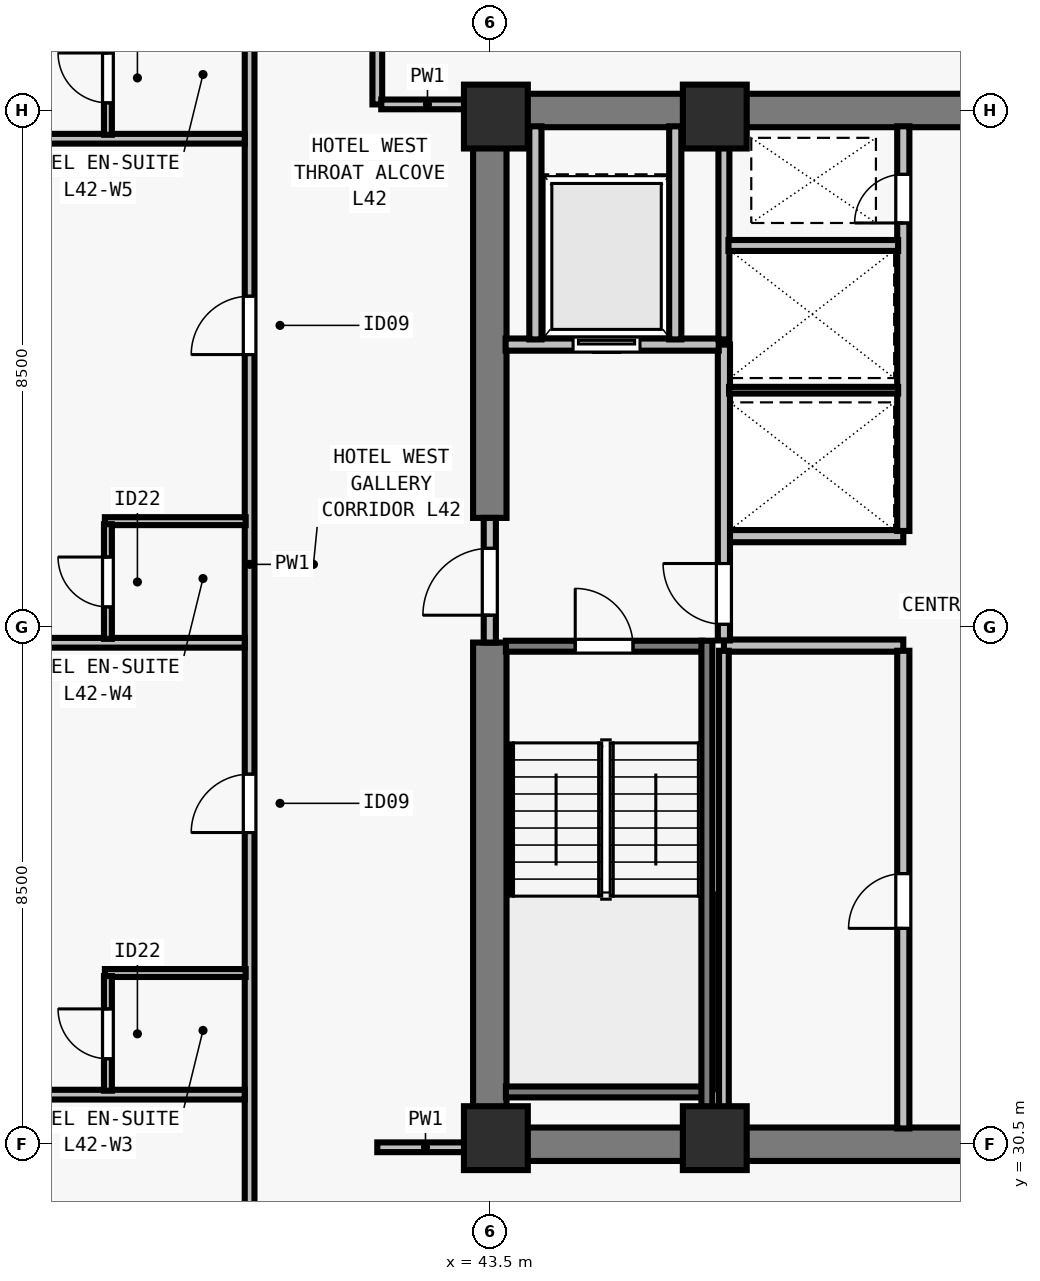
"""IFC4 building model, lengths in metres.
Left out: names, types, materials, properties, quantities, classifications, styles, units other than length and angle.
Written with IfcOpenShell. Run it as: python <this file> out.ifc"""

import sys

from ifc_helpers import new_model, si_unit, direction, frame, frame_2d, origin, origin_2d, place, context, subcontext, project, spatial, rectangle, extrude, element, fill, save


model = new_model("IFC4")
c1 = context("Model", 3, precision=1e-05, world=origin(), true_north=direction((0.0, 1.0)))
c2 = subcontext(c1, "Body", "Model", "MODEL_VIEW")
j1 = project(units=[si_unit("LENGTHUNIT", "METRE"), si_unit("PLANEANGLEUNIT", "RADIAN")], contexts=[c1])
p1 = place(None, origin())
s1 = spatial("IfcSite", under=j1, at=p1, CompositionType="ELEMENT")
p2 = place(p1, origin())
s2 = spatial("IfcBuilding", under=s1, at=p2, CompositionType="ELEMENT")
p3 = place(p2, frame((0.0, 0.0, 155.0)))
s3 = spatial("IfcBuildingStorey", under=s2, at=p3, CompositionType="ELEMENT", Elevation=155.0)
for number, where, z_axis, x_axis in (
    (1, (43.6, 30.6, 0.0), (0.0, 0.0, 1.0), (1.0, 0.0, 0.0)),
    (2, (47.2, 30.6, 0.0), (0.0, 0.0, 1.0), (1.0, 0.0, 0.0)),
    (3, (43.6, 47.4, 0.0), (0.0, 0.0, 1.0), (1.0, 0.0, 0.0)),
    (4, (47.2, 47.4, 0.0), (0.0, 0.0, 1.0), (1.0, 0.0, 0.0)),
):
    element("IfcColumn", number, at=place(p3, frame(where, z_axis=z_axis, x_axis=x_axis)), inside=s3, PredefinedType="COLUMN", context=c2, shape_type="SweptSolid", body=[
        extrude(rectangle(XDim=1.05, YDim=1.05, at=origin_2d()), origin(), (0.0, 0.0, 1.0), 3.5),
    ])
for number, where, z_axis, x_axis in (
    (5, (43.225, 30.5, 0.0), (0.0, 0.0, 1.0), (1.0, 0.0, 0.0)),
    (6, (43.225, 47.5, 0.0), (0.0, 0.0, 1.0), (1.0, 0.0, 0.0)),
):
    element("IfcWall", number, at=place(p3, frame(where, z_axis=z_axis, x_axis=x_axis)), inside=s3, PredefinedType="SHEAR", context=c2, shape_type="SweptSolid", body=[
        extrude(rectangle(XDim=17.55, YDim=0.55, at=frame_2d((8.775, 0.0))), origin(), (0.0, 0.0, 1.0), 3.28),
    ])
p4 = place(p3, frame((43.5, 30.765, 0.0), z_axis=(0.0, 0.0, 1.0), x_axis=(0.0, 1.0, 0.0)))
e7 = element("IfcWall", 7, at=p4, inside=s3, PredefinedType="SHEAR", context=c2, shape_type="SweptSolid", body=[
    extrude(rectangle(XDim=7.985, YDim=0.55, at=frame_2d((3.993, 0.0))), origin(), (0.0, 0.0, 1.0), 3.28),
])
p5 = place(p3, frame((43.5, 40.8, 0.0), z_axis=(0.0, 0.0, 1.0), x_axis=(0.0, 1.0, 0.0)))
e8 = element("IfcWall", 8, at=p5, inside=s3, PredefinedType="SHEAR", context=c2, shape_type="SweptSolid", body=[
    extrude(rectangle(XDim=6.435, YDim=0.55, at=frame_2d((3.218, 0.0))), origin(), (0.0, 0.0, 1.0), 3.28),
])
for number, where, z_axis, x_axis in (
    (9, (47.35, 38.7, 0.0), (0.0, 0.0, 1.0), (1.0, 0.0, 0.0)),
    (10, (47.35, 40.5, 0.0), (0.0, 0.0, 1.0), (1.0, 0.0, 0.0)),
):
    element("IfcWall", number, at=place(p3, frame(where, z_axis=z_axis, x_axis=x_axis)), inside=s3, PredefinedType="SOLIDWALL", context=c2, shape_type="SweptSolid", body=[
        extrude(rectangle(XDim=2.95, YDim=0.2, at=frame_2d((1.475, 0.0))), origin(), (0.0, 0.0, 1.0), 3.28),
    ])
p6 = place(p3, frame((50.3, 30.76, 0.0), z_axis=(0.0, 0.0, 1.0), x_axis=(0.0, 1.0, 0.0)))
e11 = element("IfcWall", 11, at=p6, inside=s3, PredefinedType="SOLIDWALL", context=c2, shape_type="SweptSolid", body=[
    extrude(rectangle(XDim=7.855, YDim=0.2, at=frame_2d((3.927, 0.0))), origin(), (0.0, 0.0, 1.0), 3.28),
])
p7 = place(p6, frame((3.29, 0.0, 0.0)))
e12 = element("IfcOpeningElement", 12, at=p7, cuts=e11, PredefinedType="OPENING", context=c2, shape_type="SweptSolid", body=[
    extrude(rectangle(XDim=0.9, YDim=2.12, at=frame_2d((0.45, 1.06))), frame((0.0, 0.11, 0.0), z_axis=(0.0, -1.0, 0.0), x_axis=(1.0, 0.0, 0.0)), (0.0, 0.0, 1.0), 0.22),
])
p8 = place(p3, frame((50.3, 40.585, 0.0), z_axis=(0.0, 0.0, 1.0), x_axis=(0.0, 1.0, 0.0)))
e13 = element("IfcWall", 13, at=p8, inside=s3, PredefinedType="SOLIDWALL", context=c2, shape_type="SweptSolid", body=[
    extrude(rectangle(XDim=6.655, YDim=0.2, at=frame_2d((3.328, 0.0))), origin(), (0.0, 0.0, 1.0), 3.28),
])
p9 = place(p8, frame((5.065, 0.0, 0.0)))
e14 = element("IfcOpeningElement", 14, at=p9, cuts=e13, PredefinedType="OPENING", context=c2, shape_type="SweptSolid", body=[
    extrude(rectangle(XDim=0.8, YDim=2.08, at=frame_2d((0.4, 1.04))), frame((0.0, 0.11, 0.0), z_axis=(0.0, -1.0, 0.0), x_axis=(1.0, 0.0, 0.0)), (0.0, 0.0, 1.0), 0.22),
])
p10 = place(p3, frame((43.5, 38.75, 0.0), z_axis=(0.0, 0.0, 1.0), x_axis=(0.0, 1.0, 0.0)))
e15 = element("IfcWall", 15, at=p10, inside=s3, PredefinedType="SOLIDWALL", context=c2, shape_type="SweptSolid", body=[
    extrude(rectangle(XDim=2.05, YDim=0.2, at=frame_2d((1.025, 0.0))), origin(), (0.0, 0.0, 1.0), 3.28),
])
p11 = place(p10, frame((0.45, 0.0, 0.0)))
e16 = element("IfcOpeningElement", 16, at=p11, cuts=e15, PredefinedType="OPENING", context=c2, shape_type="SweptSolid", body=[
    extrude(rectangle(XDim=1.1, YDim=2.15, at=frame_2d((0.55, 1.075))), frame((0.0, 0.11, 0.0), z_axis=(0.0, -1.0, 0.0), x_axis=(1.0, 0.0, 0.0)), (0.0, 0.0, 1.0), 0.22),
])
p12 = place(p3, frame((47.35, 38.785, 0.0), z_axis=(0.0, 0.0, 1.0), x_axis=(0.0, 1.0, 0.0)))
e17 = element("IfcWall", 17, at=p12, inside=s3, PredefinedType="SOLIDWALL", context=c2, shape_type="SweptSolid", body=[
    extrude(rectangle(XDim=4.865, YDim=0.2, at=frame_2d((2.433, 0.0))), origin(), (0.0, 0.0, 1.0), 3.28),
])
p13 = place(p12, frame((0.265, 0.0, 0.0)))
e18 = element("IfcOpeningElement", 18, at=p13, cuts=e17, PredefinedType="OPENING", context=c2, shape_type="SweptSolid", body=[
    extrude(rectangle(XDim=1.0, YDim=2.15, at=frame_2d((0.5, 1.075))), frame((0.0, 0.11, 0.0), z_axis=(0.0, -1.0, 0.0), x_axis=(1.0, 0.0, 0.0)), (0.0, 0.0, 1.0), 0.22),
])
p14 = place(p3, frame((43.76, 43.65, 0.0), z_axis=(0.0, 0.0, 1.0), x_axis=(1.0, 0.0, 0.0)))
e19 = element("IfcWall", 19, at=p14, inside=s3, PredefinedType="SOLIDWALL", context=c2, shape_type="SweptSolid", body=[
    extrude(rectangle(XDim=3.505, YDim=0.2, at=frame_2d((1.752, 0.0))), origin(), (0.0, 0.0, 1.0), 3.28),
])
p15 = place(p14, frame((1.11, 0.0, 0.0)))
e20 = element("IfcOpeningElement", 20, at=p15, cuts=e19, PredefinedType="OPENING", context=c2, shape_type="SweptSolid", body=[
    extrude(rectangle(XDim=1.1, YDim=2.2, at=frame_2d((0.55, 1.1))), frame((0.0, 0.11, 0.0), z_axis=(0.0, -1.0, 0.0), x_axis=(1.0, 0.0, 0.0)), (0.0, 0.0, 1.0), 0.22),
])
for number, where, z_axis, x_axis in (
    (21, (46.55, 43.735, 0.0), (0.0, 0.0, 1.0), (0.0, 1.0, 0.0)),
    (22, (44.25, 43.735, 0.0), (0.0, 0.0, 1.0), (0.0, 1.0, 0.0)),
):
    element("IfcWall", number, at=place(p3, frame(where, z_axis=z_axis, x_axis=x_axis)), inside=s3, PredefinedType="SOLIDWALL", context=c2, shape_type="SweptSolid", body=[
        extrude(rectangle(XDim=3.505, YDim=0.2, at=frame_2d((1.752, 0.0))), origin(), (0.0, 0.0, 1.0), 3.28),
    ])
p16 = place(p3, frame((47.35, 30.76, 0.0), z_axis=(0.0, 0.0, 1.0), x_axis=(0.0, 1.0, 0.0)))
e23 = element("IfcWall", 23, at=p16, inside=s3, PredefinedType="PARTITIONING", context=c2, shape_type="SweptSolid", body=[
    extrude(rectangle(XDim=7.855, YDim=0.16, at=frame_2d((3.927, 0.0))), origin(), (0.0, 0.0, 1.0), 3.28),
])
p17 = place(p3, frame((47.35, 43.735, 0.0), z_axis=(0.0, 0.0, 1.0), x_axis=(0.0, 1.0, 0.0)))
e24 = element("IfcWall", 24, at=p17, inside=s3, PredefinedType="SOLIDWALL", context=c2, shape_type="SweptSolid", body=[
    extrude(rectangle(XDim=3.505, YDim=0.18, at=frame_2d((1.752, 0.0))), origin(), (0.0, 0.0, 1.0), 3.28),
])
p18 = place(p3, frame((47.435, 42.9, 0.0), z_axis=(0.0, 0.0, 1.0), x_axis=(1.0, 0.0, 0.0)))
e25 = element("IfcWall", 25, at=p18, inside=s3, PredefinedType="PARTITIONING", context=c2, shape_type="SweptSolid", body=[
    extrude(rectangle(XDim=2.78, YDim=0.11, at=frame_2d((1.39, 0.0))), origin(), (0.0, 0.0, 1.0), 3.28),
])
p19 = place(p3, frame((47.425, 45.28, 0.0), z_axis=(0.0, 0.0, 1.0), x_axis=(1.0, 0.0, 0.0)))
e26 = element("IfcWall", 26, at=p19, inside=s3, PredefinedType="SOLIDWALL", context=c2, shape_type="SweptSolid", body=[
    extrude(rectangle(XDim=2.79, YDim=0.18, at=frame_2d((1.395, 0.0))), origin(), (0.0, 0.0, 1.0), 3.28),
])
p20 = place(p3, frame((39.55, 15.325, 0.0), z_axis=(0.0, 0.0, 1.0), x_axis=(0.0, 1.0, 0.0)))
e27 = element("IfcWall", 27, at=p20, inside=s3, PredefinedType="PARTITIONING", context=c2, shape_type="SweptSolid", body=[
    extrude(rectangle(XDim=47.35, YDim=0.16, at=frame_2d((23.675, 0.0))), origin(), (0.0, 0.0, 1.0), 2.555),
])
p21 = place(p20, frame((4.718, 0.0, 0.0)))
e28 = element("IfcOpeningElement", 28, at=p21, cuts=e27, PredefinedType="OPENING", context=c2, shape_type="SweptSolid", body=[
    extrude(rectangle(XDim=0.96, YDim=2.15, at=frame_2d((0.48, 1.075))), frame((0.0, 0.09, 0.0), z_axis=(0.0, -1.0, 0.0), x_axis=(1.0, 0.0, 0.0)), (0.0, 0.0, 1.0), 0.18),
])
p22 = place(p20, frame((12.441, 0.0, 0.0)))
e29 = element("IfcOpeningElement", 29, at=p22, cuts=e27, PredefinedType="OPENING", context=c2, shape_type="SweptSolid", body=[
    extrude(rectangle(XDim=0.96, YDim=2.15, at=frame_2d((0.48, 1.075))), frame((0.0, 0.09, 0.0), z_axis=(0.0, -1.0, 0.0), x_axis=(1.0, 0.0, 0.0)), (0.0, 0.0, 1.0), 0.18),
])
p23 = place(p20, frame((20.301, 0.0, 0.0)))
e30 = element("IfcOpeningElement", 30, at=p23, cuts=e27, PredefinedType="OPENING", context=c2, shape_type="SweptSolid", body=[
    extrude(rectangle(XDim=0.96, YDim=2.15, at=frame_2d((0.48, 1.075))), frame((0.0, 0.09, 0.0), z_axis=(0.0, -1.0, 0.0), x_axis=(1.0, 0.0, 0.0)), (0.0, 0.0, 1.0), 0.18),
])
p24 = place(p20, frame((28.161, 0.0, 0.0)))
e31 = element("IfcOpeningElement", 31, at=p24, cuts=e27, PredefinedType="OPENING", context=c2, shape_type="SweptSolid", body=[
    extrude(rectangle(XDim=0.96, YDim=2.15, at=frame_2d((0.48, 1.075))), frame((0.0, 0.09, 0.0), z_axis=(0.0, -1.0, 0.0), x_axis=(1.0, 0.0, 0.0)), (0.0, 0.0, 1.0), 0.18),
])
p25 = place(p20, frame((36.021, 0.0, 0.0)))
e32 = element("IfcOpeningElement", 32, at=p25, cuts=e27, PredefinedType="OPENING", context=c2, shape_type="SweptSolid", body=[
    extrude(rectangle(XDim=0.96, YDim=2.15, at=frame_2d((0.48, 1.075))), frame((0.0, 0.09, 0.0), z_axis=(0.0, -1.0, 0.0), x_axis=(1.0, 0.0, 0.0)), (0.0, 0.0, 1.0), 0.18),
])
p26 = place(p20, frame((43.793, 0.0, 0.0)))
e33 = element("IfcOpeningElement", 33, at=p26, cuts=e27, PredefinedType="OPENING", context=c2, shape_type="SweptSolid", body=[
    extrude(rectangle(XDim=0.96, YDim=2.15, at=frame_2d((0.48, 1.075))), frame((0.0, 0.09, 0.0), z_axis=(0.0, -1.0, 0.0), x_axis=(1.0, 0.0, 0.0)), (0.0, 0.0, 1.0), 0.18),
])
p27 = place(p3, frame((41.65, 47.6, 0.0), z_axis=(0.0, 0.0, 1.0), x_axis=(0.0, 1.0, 0.0)))
e34 = element("IfcWall", 34, at=p27, inside=s3, PredefinedType="PARTITIONING", context=c2, shape_type="SweptSolid", body=[
    extrude(rectangle(XDim=15.075, YDim=0.16, at=frame_2d((7.538, 0.0))), origin(), (0.0, 0.0, 1.0), 2.555),
])
p28 = place(p27, frame((1.8, 0.0, 0.0)))
e35 = element("IfcOpeningElement", 35, at=p28, cuts=e34, PredefinedType="OPENING", context=c2, shape_type="SweptSolid", body=[
    extrude(rectangle(XDim=0.96, YDim=2.12, at=frame_2d((0.48, 1.06))), frame((0.0, 0.09, 0.0), z_axis=(0.0, -1.0, 0.0), x_axis=(1.0, 0.0, 0.0)), (0.0, 0.0, 1.0), 0.18),
])
p29 = place(p3, frame((41.65, 30.45, 0.0), z_axis=(0.0, 0.0, 1.0), x_axis=(1.0, 0.0, 0.0)))
e36 = element("IfcWall", 36, at=p29, inside=s3, PredefinedType="PARTITIONING", context=c2, shape_type="SweptSolid", body=[
    extrude(rectangle(XDim=1.585, YDim=0.16, at=frame_2d((0.792, 0.0))), origin(), (0.0, 0.0, 1.0), 3.28),
])
p30 = place(p3, frame((41.715, 47.6, 0.0), z_axis=(0.0, 0.0, 1.0), x_axis=(1.0, 0.0, 0.0)))
e37 = element("IfcWall", 37, at=p30, inside=s3, PredefinedType="PARTITIONING", context=c2, shape_type="SweptSolid", body=[
    extrude(rectangle(XDim=1.52, YDim=0.16, at=frame_2d((0.76, 0.0))), origin(), (0.0, 0.0, 1.0), 3.28),
])
p31 = place(p3, frame((28.325, 31.315, 0.0), z_axis=(0.0, 0.0, 1.0), x_axis=(1.0, 0.0, 0.0)))
e38 = element("IfcWall", 38, at=p31, inside=s3, PredefinedType="PARTITIONING", context=c2, shape_type="SweptSolid", body=[
    extrude(rectangle(XDim=11.145, YDim=0.16, at=frame_2d((5.573, 0.0))), origin(), (0.0, 0.0, 1.0), 3.28),
])
p32 = place(p3, frame((37.17, 33.315, 0.0), z_axis=(0.0, 0.0, 1.0), x_axis=(1.0, 0.0, 0.0)))
e39 = element("IfcWall", 39, at=p32, inside=s3, PredefinedType="PLUMBINGWALL", context=c2, shape_type="SweptSolid", body=[
    extrude(rectangle(XDim=2.315, YDim=0.13, at=frame_2d((1.158, 0.0))), origin(), (0.0, 0.0, 1.0), 3.28),
])
p33 = place(p3, frame((37.22, 31.381, 0.0), z_axis=(0.0, 0.0, 1.0), x_axis=(0.0, 1.0, 0.0)))
e40 = element("IfcWall", 40, at=p33, inside=s3, PredefinedType="PLUMBINGWALL", context=c2, shape_type="SweptSolid", body=[
    extrude(rectangle(XDim=1.885, YDim=0.13, at=frame_2d((0.942, 0.0))), origin(), (0.0, 0.0, 1.0), 3.28),
])
p34 = place(p33, frame((0.525, 0.0, 0.0)))
e41 = element("IfcOpeningElement", 41, at=p34, cuts=e40, PredefinedType="OPENING", context=c2, shape_type="SweptSolid", body=[
    extrude(rectangle(XDim=0.82, YDim=2.1, at=frame_2d((0.41, 1.05))), frame((0.0, 0.075, 0.0), z_axis=(0.0, -1.0, 0.0), x_axis=(1.0, 0.0, 0.0)), (0.0, 0.0, 1.0), 0.15),
])
p35 = place(p3, frame((28.325, 38.747, 0.0), z_axis=(0.0, 0.0, 1.0), x_axis=(1.0, 0.0, 0.0)))
e42 = element("IfcWall", 42, at=p35, inside=s3, PredefinedType="PARTITIONING", context=c2, shape_type="SweptSolid", body=[
    extrude(rectangle(XDim=11.145, YDim=0.16, at=frame_2d((5.573, 0.0))), origin(), (0.0, 0.0, 1.0), 2.896),
])
p36 = place(p3, frame((37.17, 40.747, 0.0), z_axis=(0.0, 0.0, 1.0), x_axis=(1.0, 0.0, 0.0)))
e43 = element("IfcWall", 43, at=p36, inside=s3, PredefinedType="PLUMBINGWALL", context=c2, shape_type="SweptSolid", body=[
    extrude(rectangle(XDim=2.315, YDim=0.13, at=frame_2d((1.158, 0.0))), origin(), (0.0, 0.0, 1.0), 3.28),
])
p37 = place(p3, frame((37.22, 38.812, 0.0), z_axis=(0.0, 0.0, 1.0), x_axis=(0.0, 1.0, 0.0)))
e44 = element("IfcWall", 44, at=p37, inside=s3, PredefinedType="PLUMBINGWALL", context=c2, shape_type="SweptSolid", body=[
    extrude(rectangle(XDim=1.885, YDim=0.13, at=frame_2d((0.942, 0.0))), origin(), (0.0, 0.0, 1.0), 3.28),
])
p38 = place(p37, frame((0.525, 0.0, 0.0)))
e45 = element("IfcOpeningElement", 45, at=p38, cuts=e44, PredefinedType="OPENING", context=c2, shape_type="SweptSolid", body=[
    extrude(rectangle(XDim=0.82, YDim=2.1, at=frame_2d((0.41, 1.05))), frame((0.0, 0.075, 0.0), z_axis=(0.0, -1.0, 0.0), x_axis=(1.0, 0.0, 0.0)), (0.0, 0.0, 1.0), 0.15),
])
p39 = place(p3, frame((28.325, 47.035, 0.0), z_axis=(0.0, 0.0, 1.0), x_axis=(1.0, 0.0, 0.0)))
e46 = element("IfcWall", 46, at=p39, inside=s3, PredefinedType="PARTITIONING", context=c2, shape_type="SweptSolid", body=[
    extrude(rectangle(XDim=11.145, YDim=0.16, at=frame_2d((5.573, 0.0))), origin(), (0.0, 0.0, 1.0), 3.28),
])
p40 = place(p3, frame((37.22, 47.101, 0.0), z_axis=(0.0, 0.0, 1.0), x_axis=(0.0, 1.0, 0.0)))
e47 = element("IfcWall", 47, at=p40, inside=s3, PredefinedType="PLUMBINGWALL", context=c2, shape_type="SweptSolid", body=[
    extrude(rectangle(XDim=1.885, YDim=0.13, at=frame_2d((0.942, 0.0))), origin(), (0.0, 0.0, 1.0), 3.28),
])
p41 = place(p40, frame((0.525, 0.0, 0.0)))
e48 = element("IfcOpeningElement", 48, at=p41, cuts=e47, PredefinedType="OPENING", context=c2, shape_type="SweptSolid", body=[
    extrude(rectangle(XDim=0.82, YDim=2.1, at=frame_2d((0.41, 1.05))), frame((0.0, 0.075, 0.0), z_axis=(0.0, -1.0, 0.0), x_axis=(1.0, 0.0, 0.0)), (0.0, 0.0, 1.0), 0.15),
])
p42 = place(p3, frame((43.765, 38.69, 0.0), z_axis=(0.0, 0.0, 1.0), x_axis=(1.0, 0.0, 0.0)))
e49 = element("IfcWall", 49, at=p42, inside=s3, PredefinedType="SOLIDWALL", context=c2, shape_type="SweptSolid", body=[
    extrude(rectangle(XDim=3.23, YDim=0.18, at=frame_2d((1.615, 0.0))), origin(), (0.0, 0.0, 1.0), 3.28),
])
p43 = place(p42, frame((1.14, 0.0, 0.0)))
e50 = element("IfcOpeningElement", 50, at=p43, cuts=e49, PredefinedType="OPENING", context=c2, shape_type="SweptSolid", body=[
    extrude(rectangle(XDim=0.95, YDim=2.15, at=frame_2d((0.475, 1.075))), frame((0.0, 0.1, 0.0), z_axis=(0.0, -1.0, 0.0), x_axis=(1.0, 0.0, 0.0)), (0.0, 0.0, 1.0), 0.2),
])
p44 = place(p3, frame((43.765, 31.36, 0.0), z_axis=(0.0, 0.0, 1.0), x_axis=(1.0, 0.0, 0.0)))
e51 = element("IfcWall", 51, at=p44, inside=s3, PredefinedType="SOLIDWALL", context=c2, shape_type="SweptSolid", body=[
    extrude(rectangle(XDim=3.23, YDim=0.18, at=frame_2d((1.615, 0.0))), origin(), (0.0, 0.0, 1.0), 3.28),
])
p45 = place(p3, frame((47.07, 38.78, 0.0), z_axis=(0.0, 0.0, 1.0), x_axis=(0.0, -1.0, 0.0)))
e52 = element("IfcWall", 52, at=p45, inside=s3, PredefinedType="SOLIDWALL", context=c2, shape_type="SweptSolid", body=[
    extrude(rectangle(XDim=8.017, YDim=0.18, at=frame_2d((4.009, 0.0))), origin(), (0.0, 0.0, 1.0), 3.28),
])
p46 = place(p11, origin())
e53 = element("IfcDoor", 53, at=p46, inside=s3, OperationType="SINGLE_SWING_LEFT", PredefinedType="DOOR", context=c2, shape_type="SweptSolid", body=[
    extrude(rectangle(XDim=1.1, YDim=2.15, at=frame_2d((0.55, 1.075))), frame((0.0, 0.025, 0.0), z_axis=(0.0, -1.0, 0.0), x_axis=(1.0, 0.0, 0.0)), (0.0, 0.0, 1.0), 0.05),
])
fill(e16, e53)
p47 = place(p13, origin())
e54 = element("IfcDoor", 54, at=p47, inside=s3, OperationType="SINGLE_SWING_RIGHT", PredefinedType="DOOR", context=c2, shape_type="SweptSolid", body=[
    extrude(rectangle(XDim=1.0, YDim=2.15, at=frame_2d((0.5, 1.075))), frame((0.0, 0.025, 0.0), z_axis=(0.0, -1.0, 0.0), x_axis=(1.0, 0.0, 0.0)), (0.0, 0.0, 1.0), 0.05),
])
fill(e18, e54)
p48 = place(p15, origin())
e55 = element("IfcDoor", 55, at=p48, inside=s3, OperationType="SLIDING_TO_LEFT", PredefinedType="DOOR", context=c2, shape_type="SweptSolid", body=[
    extrude(rectangle(XDim=1.1, YDim=2.2, at=frame_2d((0.55, 1.1))), frame((0.0, 0.025, 0.0), z_axis=(0.0, -1.0, 0.0), x_axis=(1.0, 0.0, 0.0)), (0.0, 0.0, 1.0), 0.05),
])
fill(e20, e55)
p49 = place(p7, origin())
e56 = element("IfcDoor", 56, at=p49, inside=s3, OperationType="SINGLE_SWING_LEFT", PredefinedType="DOOR", context=c2, shape_type="SweptSolid", body=[
    extrude(rectangle(XDim=0.9, YDim=2.12, at=frame_2d((0.45, 1.06))), frame((0.0, 0.025, 0.0), z_axis=(0.0, -1.0, 0.0), x_axis=(1.0, 0.0, 0.0)), (0.0, 0.0, 1.0), 0.05),
])
fill(e12, e56)
p50 = place(p9, origin())
e57 = element("IfcDoor", 57, at=p50, inside=s3, OperationType="SINGLE_SWING_LEFT", PredefinedType="DOOR", context=c2, shape_type="SweptSolid", body=[
    extrude(rectangle(XDim=0.8, YDim=2.08, at=frame_2d((0.4, 1.04))), frame((0.0, 0.025, 0.0), z_axis=(0.0, -1.0, 0.0), x_axis=(1.0, 0.0, 0.0)), (0.0, 0.0, 1.0), 0.05),
])
fill(e14, e57)
p51 = place(p34, origin())
e58 = element("IfcDoor", 58, at=p51, inside=s3, OperationType="SINGLE_SWING_RIGHT", PredefinedType="DOOR", context=c2, shape_type="SweptSolid", body=[
    extrude(rectangle(XDim=0.82, YDim=2.1, at=frame_2d((0.41, 1.05))), frame((0.0, 0.025, 0.0), z_axis=(0.0, -1.0, 0.0), x_axis=(1.0, 0.0, 0.0)), (0.0, 0.0, 1.0), 0.05),
])
fill(e41, e58)
p52 = place(p23, origin())
e59 = element("IfcDoor", 59, at=p52, inside=s3, OperationType="SINGLE_SWING_LEFT", PredefinedType="DOOR", context=c2, shape_type="SweptSolid", body=[
    extrude(rectangle(XDim=0.96, YDim=2.15, at=frame_2d((0.48, 1.075))), frame((0.0, 0.025, 0.0), z_axis=(0.0, -1.0, 0.0), x_axis=(1.0, 0.0, 0.0)), (0.0, 0.0, 1.0), 0.05),
])
fill(e30, e59)
p53 = place(p38, origin())
e60 = element("IfcDoor", 60, at=p53, inside=s3, OperationType="SINGLE_SWING_RIGHT", PredefinedType="DOOR", context=c2, shape_type="SweptSolid", body=[
    extrude(rectangle(XDim=0.82, YDim=2.1, at=frame_2d((0.41, 1.05))), frame((0.0, 0.025, 0.0), z_axis=(0.0, -1.0, 0.0), x_axis=(1.0, 0.0, 0.0)), (0.0, 0.0, 1.0), 0.05),
])
fill(e45, e60)
p54 = place(p24, origin())
e61 = element("IfcDoor", 61, at=p54, inside=s3, OperationType="SINGLE_SWING_LEFT", PredefinedType="DOOR", context=c2, shape_type="SweptSolid", body=[
    extrude(rectangle(XDim=0.96, YDim=2.15, at=frame_2d((0.48, 1.075))), frame((0.0, 0.025, 0.0), z_axis=(0.0, -1.0, 0.0), x_axis=(1.0, 0.0, 0.0)), (0.0, 0.0, 1.0), 0.05),
])
fill(e31, e61)
p55 = place(p41, origin())
e62 = element("IfcDoor", 62, at=p55, inside=s3, OperationType="SINGLE_SWING_RIGHT", PredefinedType="DOOR", context=c2, shape_type="SweptSolid", body=[
    extrude(rectangle(XDim=0.82, YDim=2.1, at=frame_2d((0.41, 1.05))), frame((0.0, 0.025, 0.0), z_axis=(0.0, -1.0, 0.0), x_axis=(1.0, 0.0, 0.0)), (0.0, 0.0, 1.0), 0.05),
])
fill(e48, e62)
p56 = place(p43, origin())
e63 = element("IfcDoor", 63, at=p56, inside=s3, OperationType="SINGLE_SWING_LEFT", PredefinedType="DOOR", context=c2, shape_type="SweptSolid", body=[
    extrude(rectangle(XDim=0.95, YDim=2.15, at=frame_2d((0.475, 1.075))), frame((0.0, 0.025, 0.0), z_axis=(0.0, -1.0, 0.0), x_axis=(1.0, 0.0, 0.0)), (0.0, 0.0, 1.0), 0.05),
])
fill(e50, e63)
save(model, sys.argv[1])
